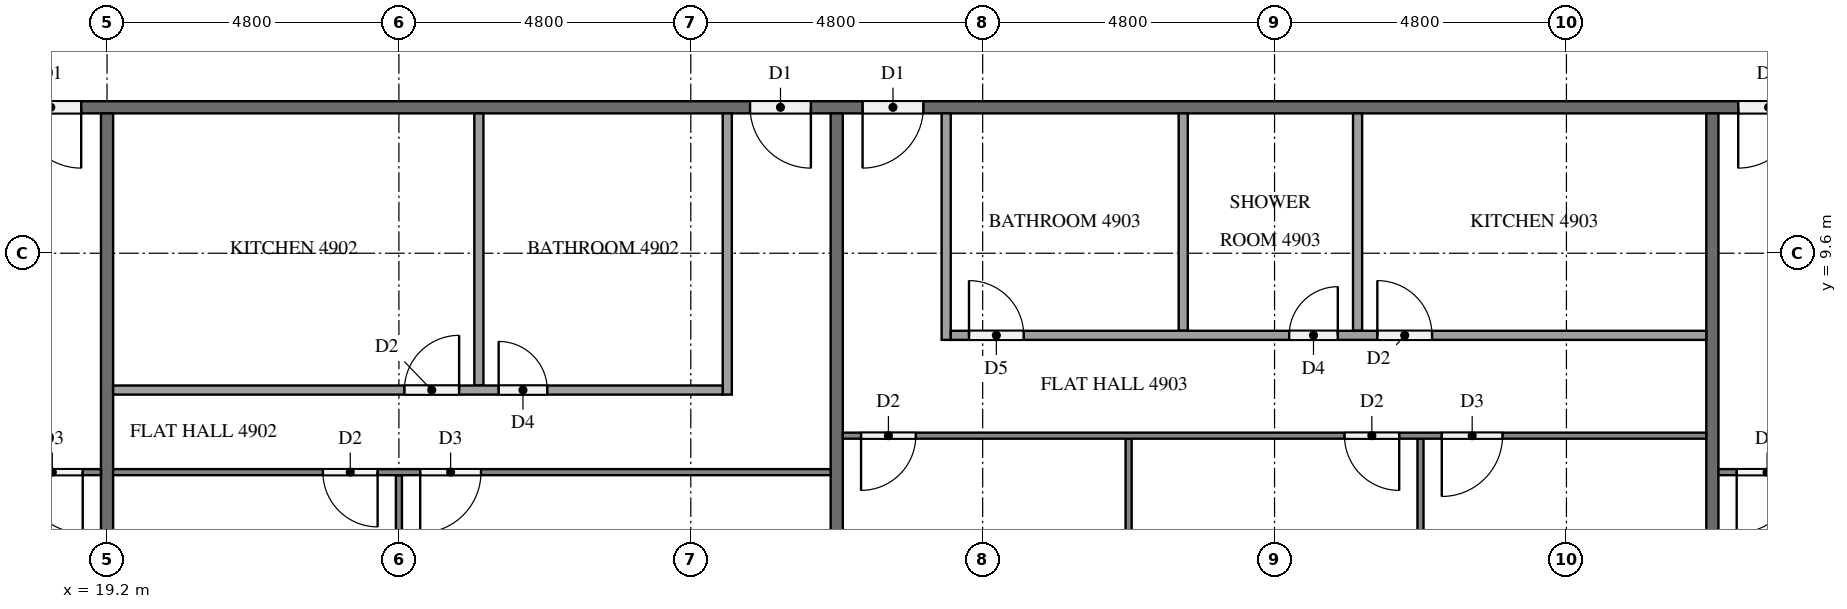
"""IFC4 building model, lengths in metres.
Left out: names, types, materials, properties, quantities, classifications, styles, units other than length and angle.
Written with IfcOpenShell. Run it as: python <this file> out.ifc"""

import sys

from ifc_helpers import new_model, si_unit, direction, frame, frame_2d, origin, place, context, subcontext, project, spatial, rectangle, extrude, element, fill, save


model = new_model("IFC4")
c1 = context("Model", 3, precision=1e-05, world=origin(), true_north=direction((0.0, 1.0)))
c2 = subcontext(c1, "Body", "Model", "MODEL_VIEW")
j1 = project(units=[si_unit("LENGTHUNIT", "METRE"), si_unit("PLANEANGLEUNIT", "RADIAN")], contexts=[c1])
p1 = place(None, origin())
s1 = spatial("IfcSite", under=j1, at=p1, CompositionType="ELEMENT")
p2 = place(p1, origin())
s2 = spatial("IfcBuilding", under=s1, at=p2, CompositionType="ELEMENT")
p3 = place(p2, frame((0.0, 0.0, 189.4)))
s3 = spatial("IfcBuildingStorey", under=s2, at=p3, CompositionType="ELEMENT", Elevation=189.4)
p4 = place(p3, frame((50.5, 12.0, 0.0), z_axis=(0.0, 0.0, 1.0), x_axis=(-1.0, 0.0, 0.0)))
e1 = element("IfcWall", 1, at=p4, inside=s3, PredefinedType="PARTITIONING", context=c2, shape_type="SweptSolid", body=[
    extrude(rectangle(XDim=38.6, YDim=0.2, at=frame_2d((19.3, 0.0))), origin(), (0.0, 0.0, 1.0), 3.2),
])
p5 = place(p4, frame((31.725, 0.0, 0.0)))
e2 = element("IfcOpeningElement", 2, at=p5, cuts=e1, PredefinedType="OPENING", context=c2, shape_type="SweptSolid", body=[
    extrude(rectangle(XDim=1.0, YDim=2.1, at=frame_2d((0.5, 1.05))), frame((0.0, 0.11, 0.0), z_axis=(0.0, -1.0, 0.0), x_axis=(1.0, 0.0, 0.0)), (0.0, 0.0, 1.0), 0.22),
])
p6 = place(p4, frame((19.725, 0.0, 0.0)))
e3 = element("IfcOpeningElement", 3, at=p6, cuts=e1, PredefinedType="OPENING", context=c2, shape_type="SweptSolid", body=[
    extrude(rectangle(XDim=1.0, YDim=2.1, at=frame_2d((0.5, 1.05))), frame((0.0, 0.11, 0.0), z_axis=(0.0, -1.0, 0.0), x_axis=(1.0, 0.0, 0.0)), (0.0, 0.0, 1.0), 0.22),
])
p7 = place(p4, frame((17.875, 0.0, 0.0)))
e4 = element("IfcOpeningElement", 4, at=p7, cuts=e1, PredefinedType="OPENING", context=c2, shape_type="SweptSolid", body=[
    extrude(rectangle(XDim=1.0, YDim=2.1, at=frame_2d((0.5, 1.05))), frame((0.0, 0.11, 0.0), z_axis=(0.0, -1.0, 0.0), x_axis=(1.0, 0.0, 0.0)), (0.0, 0.0, 1.0), 0.22),
])
p8 = place(p4, frame((3.475, 0.0, 0.0)))
e5 = element("IfcOpeningElement", 5, at=p8, cuts=e1, PredefinedType="OPENING", context=c2, shape_type="SweptSolid", body=[
    extrude(rectangle(XDim=1.0, YDim=2.1, at=frame_2d((0.5, 1.05))), frame((0.0, 0.11, 0.0), z_axis=(0.0, -1.0, 0.0), x_axis=(1.0, 0.0, 0.0)), (0.0, 0.0, 1.0), 0.22),
])
p9 = place(p3, frame((19.2, 11.9, 0.0), z_axis=(0.0, 0.0, 1.0), x_axis=(0.0, -1.0, 0.0)))
e6 = element("IfcWall", 6, at=p9, inside=s3, PredefinedType="PARTITIONING", context=c2, shape_type="SweptSolid", body=[
    extrude(rectangle(XDim=11.575, YDim=0.2, at=frame_2d((5.788, 0.0))), origin(), (0.0, 0.0, 1.0), 3.2),
])
for number, where, z_axis, x_axis in (
    (7, (31.2, 11.9, 0.0), (0.0, 0.0, 1.0), (0.0, -1.0, 0.0)),
    (8, (45.6, 11.9, 0.0), (0.0, 0.0, 1.0), (0.0, -1.0, 0.0)),
):
    element("IfcWall", number, at=place(p3, frame(where, z_axis=z_axis, x_axis=x_axis)), inside=s3, PredefinedType="PARTITIONING", context=c2, shape_type="SweptSolid", body=[
        extrude(rectangle(XDim=11.8, YDim=0.2, at=frame_2d((5.9, 0.0))), origin(), (0.0, 0.0, 1.0), 3.2),
    ])
p10 = place(p3, frame((19.1, 6.0, 0.0), z_axis=(0.0, 0.0, 1.0), x_axis=(-1.0, 0.0, 0.0)))
e9 = element("IfcWall", 9, at=p10, inside=s3, PredefinedType="PARTITIONING", context=c2, shape_type="SweptSolid", body=[
    extrude(rectangle(XDim=14.2, YDim=0.1, at=frame_2d((7.1, 0.0))), origin(), (0.0, 0.0, 1.0), 3.2),
])
p11 = place(p10, frame((0.3, 0.0, 0.0)))
e10 = element("IfcOpeningElement", 10, at=p11, cuts=e9, PredefinedType="OPENING", context=c2, shape_type="SweptSolid", body=[
    extrude(rectangle(XDim=1.0, YDim=2.1, at=frame_2d((0.5, 1.05))), frame((0.0, 0.06, 0.0), z_axis=(0.0, -1.0, 0.0), x_axis=(1.0, 0.0, 0.0)), (0.0, 0.0, 1.0), 0.12),
])
p12 = place(p10, frame((8.25, 0.0, 0.0)))
e11 = element("IfcOpeningElement", 11, at=p12, cuts=e9, PredefinedType="OPENING", context=c2, shape_type="SweptSolid", body=[
    extrude(rectangle(XDim=0.9, YDim=2.1, at=frame_2d((0.45, 1.05))), frame((0.0, 0.06, 0.0), z_axis=(0.0, -1.0, 0.0), x_axis=(1.0, 0.0, 0.0)), (0.0, 0.0, 1.0), 0.12),
])
p13 = place(p10, frame((9.85, 0.0, 0.0)))
e12 = element("IfcOpeningElement", 12, at=p13, cuts=e9, PredefinedType="OPENING", context=c2, shape_type="SweptSolid", body=[
    extrude(rectangle(XDim=0.9, YDim=2.1, at=frame_2d((0.45, 1.05))), frame((0.0, 0.06, 0.0), z_axis=(0.0, -1.0, 0.0), x_axis=(1.0, 0.0, 0.0)), (0.0, 0.0, 1.0), 0.12),
])
p14 = place(p3, frame((24.0, 5.95, 0.0), z_axis=(0.0, 0.0, 1.0), x_axis=(0.0, -1.0, 0.0)))
e13 = element("IfcWall", 13, at=p14, inside=s3, PredefinedType="PARTITIONING", context=c2, shape_type="SweptSolid", body=[
    extrude(rectangle(XDim=5.85, YDim=0.1, at=frame_2d((2.925, 0.0))), origin(), (0.0, 0.0, 1.0), 3.2),
])
p15 = place(p3, frame((31.1, 6.0, 0.0), z_axis=(0.0, 0.0, 1.0), x_axis=(-1.0, 0.0, 0.0)))
e14 = element("IfcWall", 14, at=p15, inside=s3, PredefinedType="PARTITIONING", context=c2, shape_type="SweptSolid", body=[
    extrude(rectangle(XDim=11.8, YDim=0.1, at=frame_2d((5.9, 0.0))), origin(), (0.0, 0.0, 1.0), 3.2),
])
p16 = place(p15, frame((5.75, 0.0, 0.0)))
e15 = element("IfcOpeningElement", 15, at=p16, cuts=e14, PredefinedType="OPENING", context=c2, shape_type="SweptSolid", body=[
    extrude(rectangle(XDim=1.0, YDim=2.1, at=frame_2d((0.5, 1.05))), frame((0.0, 0.06, 0.0), z_axis=(0.0, -1.0, 0.0), x_axis=(1.0, 0.0, 0.0)), (0.0, 0.0, 1.0), 0.12),
])
p17 = place(p15, frame((7.45, 0.0, 0.0)))
e16 = element("IfcOpeningElement", 16, at=p17, cuts=e14, PredefinedType="OPENING", context=c2, shape_type="SweptSolid", body=[
    extrude(rectangle(XDim=0.9, YDim=2.1, at=frame_2d((0.45, 1.05))), frame((0.0, 0.06, 0.0), z_axis=(0.0, -1.0, 0.0), x_axis=(1.0, 0.0, 0.0)), (0.0, 0.0, 1.0), 0.12),
])
p18 = place(p3, frame((25.315, 11.9, 0.0), z_axis=(0.0, 0.0, 1.0), x_axis=(0.0, -1.0, 0.0)))
e17 = element("IfcWall", 17, at=p18, inside=s3, PredefinedType="PARTITIONING", context=c2, shape_type="SweptSolid", body=[
    extrude(rectangle(XDim=4.475, YDim=0.15, at=frame_2d((2.237, 0.0))), origin(), (0.0, 0.0, 1.0), 3.2),
])
p19 = place(p3, frame((29.4, 11.9, 0.0), z_axis=(0.0, 0.0, 1.0), x_axis=(0.0, -1.0, 0.0)))
e18 = element("IfcWall", 18, at=p19, inside=s3, PredefinedType="PARTITIONING", context=c2, shape_type="SweptSolid", body=[
    extrude(rectangle(XDim=4.625, YDim=0.15, at=frame_2d((2.312, 0.0))), origin(), (0.0, 0.0, 1.0), 3.2),
])
p20 = place(p3, frame((19.3, 7.35, 0.0), z_axis=(0.0, 0.0, 1.0), x_axis=(1.0, 0.0, 0.0)))
e19 = element("IfcWall", 19, at=p20, inside=s3, PredefinedType="PARTITIONING", context=c2, shape_type="SweptSolid", body=[
    extrude(rectangle(XDim=10.025, YDim=0.15, at=frame_2d((5.012, 0.0))), origin(), (0.0, 0.0, 1.0), 3.2),
])
p21 = place(p20, frame((6.34, 0.0, 0.0)))
e20 = element("IfcOpeningElement", 20, at=p21, cuts=e19, PredefinedType="OPENING", context=c2, shape_type="SweptSolid", body=[
    extrude(rectangle(XDim=0.8, YDim=2.1, at=frame_2d((0.4, 1.05))), frame((0.0, 0.085, 0.0), z_axis=(0.0, -1.0, 0.0), x_axis=(1.0, 0.0, 0.0)), (0.0, 0.0, 1.0), 0.17),
])
p22 = place(p20, frame((4.79, 0.0, 0.0)))
e21 = element("IfcOpeningElement", 21, at=p22, cuts=e19, PredefinedType="OPENING", context=c2, shape_type="SweptSolid", body=[
    extrude(rectangle(XDim=0.9, YDim=2.1, at=frame_2d((0.45, 1.05))), frame((0.0, 0.085, 0.0), z_axis=(0.0, -1.0, 0.0), x_axis=(1.0, 0.0, 0.0)), (0.0, 0.0, 1.0), 0.17),
])
for number, where, z_axis, x_axis in (
    (22, (36.0, 6.55, 0.0), (0.0, 0.0, 1.0), (0.0, -1.0, 0.0)),
    (23, (40.8, 6.55, 0.0), (0.0, 0.0, 1.0), (0.0, -1.0, 0.0)),
):
    element("IfcWall", number, at=place(p3, frame(where, z_axis=z_axis, x_axis=x_axis)), inside=s3, PredefinedType="PARTITIONING", context=c2, shape_type="SweptSolid", body=[
        extrude(rectangle(XDim=6.45, YDim=0.1, at=frame_2d((3.225, 0.0))), origin(), (0.0, 0.0, 1.0), 3.2),
    ])
p23 = place(p3, frame((45.5, 6.6, 0.0), z_axis=(0.0, 0.0, 1.0), x_axis=(-1.0, 0.0, 0.0)))
e24 = element("IfcWall", 24, at=p23, inside=s3, PredefinedType="PARTITIONING", context=c2, shape_type="SweptSolid", body=[
    extrude(rectangle(XDim=14.2, YDim=0.1, at=frame_2d((7.1, 0.0))), origin(), (0.0, 0.0, 1.0), 3.2),
])
p24 = place(p23, frame((13.0, 0.0, 0.0)))
e25 = element("IfcOpeningElement", 25, at=p24, cuts=e24, PredefinedType="OPENING", context=c2, shape_type="SweptSolid", body=[
    extrude(rectangle(XDim=0.9, YDim=2.1, at=frame_2d((0.45, 1.05))), frame((0.0, 0.06, 0.0), z_axis=(0.0, -1.0, 0.0), x_axis=(1.0, 0.0, 0.0)), (0.0, 0.0, 1.0), 0.12),
])
p25 = place(p23, frame((5.05, 0.0, 0.0)))
e26 = element("IfcOpeningElement", 26, at=p25, cuts=e24, PredefinedType="OPENING", context=c2, shape_type="SweptSolid", body=[
    extrude(rectangle(XDim=0.9, YDim=2.1, at=frame_2d((0.45, 1.05))), frame((0.0, 0.06, 0.0), z_axis=(0.0, -1.0, 0.0), x_axis=(1.0, 0.0, 0.0)), (0.0, 0.0, 1.0), 0.12),
])
p26 = place(p23, frame((3.35, 0.0, 0.0)))
e27 = element("IfcOpeningElement", 27, at=p26, cuts=e24, PredefinedType="OPENING", context=c2, shape_type="SweptSolid", body=[
    extrude(rectangle(XDim=1.0, YDim=2.1, at=frame_2d((0.5, 1.05))), frame((0.0, 0.06, 0.0), z_axis=(0.0, -1.0, 0.0), x_axis=(1.0, 0.0, 0.0)), (0.0, 0.0, 1.0), 0.12),
])
for number, where, z_axis, x_axis in (
    (28, (36.898, 11.9, 0.0), (0.0, 0.0, 1.0), (0.0, -1.0, 0.0)),
    (29, (39.765, 11.9, 0.0), (0.0, 0.0, 1.0), (0.0, -1.0, 0.0)),
):
    element("IfcWall", number, at=place(p3, frame(where, z_axis=z_axis, x_axis=x_axis)), inside=s3, PredefinedType="PARTITIONING", context=c2, shape_type="SweptSolid", body=[
        extrude(rectangle(XDim=3.575, YDim=0.15, at=frame_2d((1.788, 0.0))), origin(), (0.0, 0.0, 1.0), 3.2),
    ])
p27 = place(p3, frame((33.0, 11.9, 0.0), z_axis=(0.0, 0.0, 1.0), x_axis=(0.0, -1.0, 0.0)))
e30 = element("IfcWall", 30, at=p27, inside=s3, PredefinedType="PARTITIONING", context=c2, shape_type="SweptSolid", body=[
    extrude(rectangle(XDim=3.725, YDim=0.15, at=frame_2d((1.862, 0.0))), origin(), (0.0, 0.0, 1.0), 3.2),
])
p28 = place(p3, frame((33.075, 8.25, 0.0), z_axis=(0.0, 0.0, 1.0), x_axis=(1.0, 0.0, 0.0)))
e31 = element("IfcWall", 31, at=p28, inside=s3, PredefinedType="PARTITIONING", context=c2, shape_type="SweptSolid", body=[
    extrude(rectangle(XDim=12.425, YDim=0.15, at=frame_2d((6.212, 0.0))), origin(), (0.0, 0.0, 1.0), 3.2),
])
p29 = place(p28, frame((0.3, 0.0, 0.0)))
e32 = element("IfcOpeningElement", 32, at=p29, cuts=e31, PredefinedType="OPENING", context=c2, shape_type="SweptSolid", body=[
    extrude(rectangle(XDim=0.9, YDim=2.1, at=frame_2d((0.45, 1.05))), frame((0.0, 0.085, 0.0), z_axis=(0.0, -1.0, 0.0), x_axis=(1.0, 0.0, 0.0)), (0.0, 0.0, 1.0), 0.17),
])
p30 = place(p28, frame((5.565, 0.0, 0.0)))
e33 = element("IfcOpeningElement", 33, at=p30, cuts=e31, PredefinedType="OPENING", context=c2, shape_type="SweptSolid", body=[
    extrude(rectangle(XDim=0.8, YDim=2.1, at=frame_2d((0.4, 1.05))), frame((0.0, 0.085, 0.0), z_axis=(0.0, -1.0, 0.0), x_axis=(1.0, 0.0, 0.0)), (0.0, 0.0, 1.0), 0.17),
])
p31 = place(p28, frame((7.015, 0.0, 0.0)))
e34 = element("IfcOpeningElement", 34, at=p31, cuts=e31, PredefinedType="OPENING", context=c2, shape_type="SweptSolid", body=[
    extrude(rectangle(XDim=0.9, YDim=2.1, at=frame_2d((0.45, 1.05))), frame((0.0, 0.085, 0.0), z_axis=(0.0, -1.0, 0.0), x_axis=(1.0, 0.0, 0.0)), (0.0, 0.0, 1.0), 0.17),
])
p32 = place(p3, frame((62.3, 6.0, 0.0), z_axis=(0.0, 0.0, 1.0), x_axis=(-1.0, 0.0, 0.0)))
e35 = element("IfcWall", 35, at=p32, inside=s3, PredefinedType="PARTITIONING", context=c2, shape_type="SweptSolid", body=[
    extrude(rectangle(XDim=16.6, YDim=0.1, at=frame_2d((8.3, 0.0))), origin(), (0.0, 0.0, 1.0), 3.2),
])
p33 = place(p32, frame((15.3, 0.0, 0.0)))
e36 = element("IfcOpeningElement", 36, at=p33, cuts=e35, PredefinedType="OPENING", context=c2, shape_type="SweptSolid", body=[
    extrude(rectangle(XDim=1.0, YDim=2.1, at=frame_2d((0.5, 1.05))), frame((0.0, 0.06, 0.0), z_axis=(0.0, -1.0, 0.0), x_axis=(1.0, 0.0, 0.0)), (0.0, 0.0, 1.0), 0.12),
])
p34 = place(p32, frame((5.05, 0.0, 0.0)))
e37 = element("IfcOpeningElement", 37, at=p34, cuts=e35, PredefinedType="OPENING", context=c2, shape_type="SweptSolid", body=[
    extrude(rectangle(XDim=0.9, YDim=2.1, at=frame_2d((0.45, 1.05))), frame((0.0, 0.06, 0.0), z_axis=(0.0, -1.0, 0.0), x_axis=(1.0, 0.0, 0.0)), (0.0, 0.0, 1.0), 0.12),
])
p35 = place(p32, frame((3.45, 0.0, 0.0)))
e38 = element("IfcOpeningElement", 38, at=p35, cuts=e35, PredefinedType="OPENING", context=c2, shape_type="SweptSolid", body=[
    extrude(rectangle(XDim=0.9, YDim=2.1, at=frame_2d((0.45, 1.05))), frame((0.0, 0.06, 0.0), z_axis=(0.0, -1.0, 0.0), x_axis=(1.0, 0.0, 0.0)), (0.0, 0.0, 1.0), 0.12),
])
p36 = place(p5, origin())
e39 = element("IfcDoor", 39, at=p36, inside=s3, OperationType="SINGLE_SWING_LEFT", PredefinedType="DOOR", context=c2, shape_type="SweptSolid", body=[
    extrude(rectangle(XDim=1.0, YDim=2.1, at=frame_2d((0.5, 1.05))), frame((0.0, 0.025, 0.0), z_axis=(0.0, -1.0, 0.0), x_axis=(1.0, 0.0, 0.0)), (0.0, 0.0, 1.0), 0.05),
])
fill(e2, e39)
p37 = place(p6, origin())
e40 = element("IfcDoor", 40, at=p37, inside=s3, OperationType="SINGLE_SWING_LEFT", PredefinedType="DOOR", context=c2, shape_type="SweptSolid", body=[
    extrude(rectangle(XDim=1.0, YDim=2.1, at=frame_2d((0.5, 1.05))), frame((0.0, 0.025, 0.0), z_axis=(0.0, -1.0, 0.0), x_axis=(1.0, 0.0, 0.0)), (0.0, 0.0, 1.0), 0.05),
])
fill(e3, e40)
p38 = place(p7, origin())
e41 = element("IfcDoor", 41, at=p38, inside=s3, OperationType="SINGLE_SWING_RIGHT", PredefinedType="DOOR", context=c2, shape_type="SweptSolid", body=[
    extrude(rectangle(XDim=1.0, YDim=2.1, at=frame_2d((0.5, 1.05))), frame((0.0, 0.025, 0.0), z_axis=(0.0, -1.0, 0.0), x_axis=(1.0, 0.0, 0.0)), (0.0, 0.0, 1.0), 0.05),
])
fill(e4, e41)
p39 = place(p8, origin())
e42 = element("IfcDoor", 42, at=p39, inside=s3, OperationType="SINGLE_SWING_RIGHT", PredefinedType="DOOR", context=c2, shape_type="SweptSolid", body=[
    extrude(rectangle(XDim=1.0, YDim=2.1, at=frame_2d((0.5, 1.05))), frame((0.0, 0.025, 0.0), z_axis=(0.0, -1.0, 0.0), x_axis=(1.0, 0.0, 0.0)), (0.0, 0.0, 1.0), 0.05),
])
fill(e5, e42)
p40 = place(p11, origin())
e43 = element("IfcDoor", 43, at=p40, inside=s3, OperationType="SINGLE_SWING_LEFT", PredefinedType="DOOR", context=c2, shape_type="SweptSolid", body=[
    extrude(rectangle(XDim=1.0, YDim=2.1, at=frame_2d((0.5, 1.05))), frame((0.0, 0.025, 0.0), z_axis=(0.0, -1.0, 0.0), x_axis=(1.0, 0.0, 0.0)), (0.0, 0.0, 1.0), 0.05),
])
fill(e10, e43)
p41 = place(p16, origin())
e44 = element("IfcDoor", 44, at=p41, inside=s3, OperationType="SINGLE_SWING_RIGHT", PredefinedType="DOOR", context=c2, shape_type="SweptSolid", body=[
    extrude(rectangle(XDim=1.0, YDim=2.1, at=frame_2d((0.5, 1.05))), frame((0.0, 0.025, 0.0), z_axis=(0.0, -1.0, 0.0), x_axis=(1.0, 0.0, 0.0)), (0.0, 0.0, 1.0), 0.05),
])
fill(e15, e44)
p42 = place(p17, origin())
e45 = element("IfcDoor", 45, at=p42, inside=s3, OperationType="SINGLE_SWING_LEFT", PredefinedType="DOOR", context=c2, shape_type="SweptSolid", body=[
    extrude(rectangle(XDim=0.9, YDim=2.1, at=frame_2d((0.45, 1.05))), frame((0.0, 0.025, 0.0), z_axis=(0.0, -1.0, 0.0), x_axis=(1.0, 0.0, 0.0)), (0.0, 0.0, 1.0), 0.05),
])
fill(e16, e45)
p43 = place(p21, origin())
e46 = element("IfcDoor", 46, at=p43, inside=s3, OperationType="SINGLE_SWING_LEFT", PredefinedType="DOOR", context=c2, shape_type="SweptSolid", body=[
    extrude(rectangle(XDim=0.8, YDim=2.1, at=frame_2d((0.4, 1.05))), frame((0.0, 0.025, 0.0), z_axis=(0.0, -1.0, 0.0), x_axis=(1.0, 0.0, 0.0)), (0.0, 0.0, 1.0), 0.05),
])
fill(e20, e46)
p44 = place(p22, origin())
e47 = element("IfcDoor", 47, at=p44, inside=s3, OperationType="SINGLE_SWING_RIGHT", PredefinedType="DOOR", context=c2, shape_type="SweptSolid", body=[
    extrude(rectangle(XDim=0.9, YDim=2.1, at=frame_2d((0.45, 1.05))), frame((0.0, 0.025, 0.0), z_axis=(0.0, -1.0, 0.0), x_axis=(1.0, 0.0, 0.0)), (0.0, 0.0, 1.0), 0.05),
])
fill(e21, e47)
p45 = place(p24, origin())
e48 = element("IfcDoor", 48, at=p45, inside=s3, OperationType="SINGLE_SWING_RIGHT", PredefinedType="DOOR", context=c2, shape_type="SweptSolid", body=[
    extrude(rectangle(XDim=0.9, YDim=2.1, at=frame_2d((0.45, 1.05))), frame((0.0, 0.025, 0.0), z_axis=(0.0, -1.0, 0.0), x_axis=(1.0, 0.0, 0.0)), (0.0, 0.0, 1.0), 0.05),
])
fill(e25, e48)
p46 = place(p25, origin())
e49 = element("IfcDoor", 49, at=p46, inside=s3, OperationType="SINGLE_SWING_LEFT", PredefinedType="DOOR", context=c2, shape_type="SweptSolid", body=[
    extrude(rectangle(XDim=0.9, YDim=2.1, at=frame_2d((0.45, 1.05))), frame((0.0, 0.025, 0.0), z_axis=(0.0, -1.0, 0.0), x_axis=(1.0, 0.0, 0.0)), (0.0, 0.0, 1.0), 0.05),
])
fill(e26, e49)
p47 = place(p26, origin())
e50 = element("IfcDoor", 50, at=p47, inside=s3, OperationType="SINGLE_SWING_RIGHT", PredefinedType="DOOR", context=c2, shape_type="SweptSolid", body=[
    extrude(rectangle(XDim=1.0, YDim=2.1, at=frame_2d((0.5, 1.05))), frame((0.0, 0.025, 0.0), z_axis=(0.0, -1.0, 0.0), x_axis=(1.0, 0.0, 0.0)), (0.0, 0.0, 1.0), 0.05),
])
fill(e27, e50)
p48 = place(p29, origin())
e51 = element("IfcDoor", 51, at=p48, inside=s3, OperationType="SINGLE_SWING_LEFT", PredefinedType="DOOR", context=c2, shape_type="SweptSolid", body=[
    extrude(rectangle(XDim=0.9, YDim=2.1, at=frame_2d((0.45, 1.05))), frame((0.0, 0.025, 0.0), z_axis=(0.0, -1.0, 0.0), x_axis=(1.0, 0.0, 0.0)), (0.0, 0.0, 1.0), 0.05),
])
fill(e32, e51)
p49 = place(p30, origin())
e52 = element("IfcDoor", 52, at=p49, inside=s3, OperationType="SINGLE_SWING_RIGHT", PredefinedType="DOOR", context=c2, shape_type="SweptSolid", body=[
    extrude(rectangle(XDim=0.8, YDim=2.1, at=frame_2d((0.4, 1.05))), frame((0.0, 0.025, 0.0), z_axis=(0.0, -1.0, 0.0), x_axis=(1.0, 0.0, 0.0)), (0.0, 0.0, 1.0), 0.05),
])
fill(e33, e52)
p50 = place(p31, origin())
e53 = element("IfcDoor", 53, at=p50, inside=s3, OperationType="SINGLE_SWING_LEFT", PredefinedType="DOOR", context=c2, shape_type="SweptSolid", body=[
    extrude(rectangle(XDim=0.9, YDim=2.1, at=frame_2d((0.45, 1.05))), frame((0.0, 0.025, 0.0), z_axis=(0.0, -1.0, 0.0), x_axis=(1.0, 0.0, 0.0)), (0.0, 0.0, 1.0), 0.05),
])
fill(e34, e53)
p51 = place(p33, origin())
e54 = element("IfcDoor", 54, at=p51, inside=s3, OperationType="SINGLE_SWING_RIGHT", PredefinedType="DOOR", context=c2, shape_type="SweptSolid", body=[
    extrude(rectangle(XDim=1.0, YDim=2.1, at=frame_2d((0.5, 1.05))), frame((0.0, 0.025, 0.0), z_axis=(0.0, -1.0, 0.0), x_axis=(1.0, 0.0, 0.0)), (0.0, 0.0, 1.0), 0.05),
])
fill(e36, e54)
save(model, sys.argv[1])
